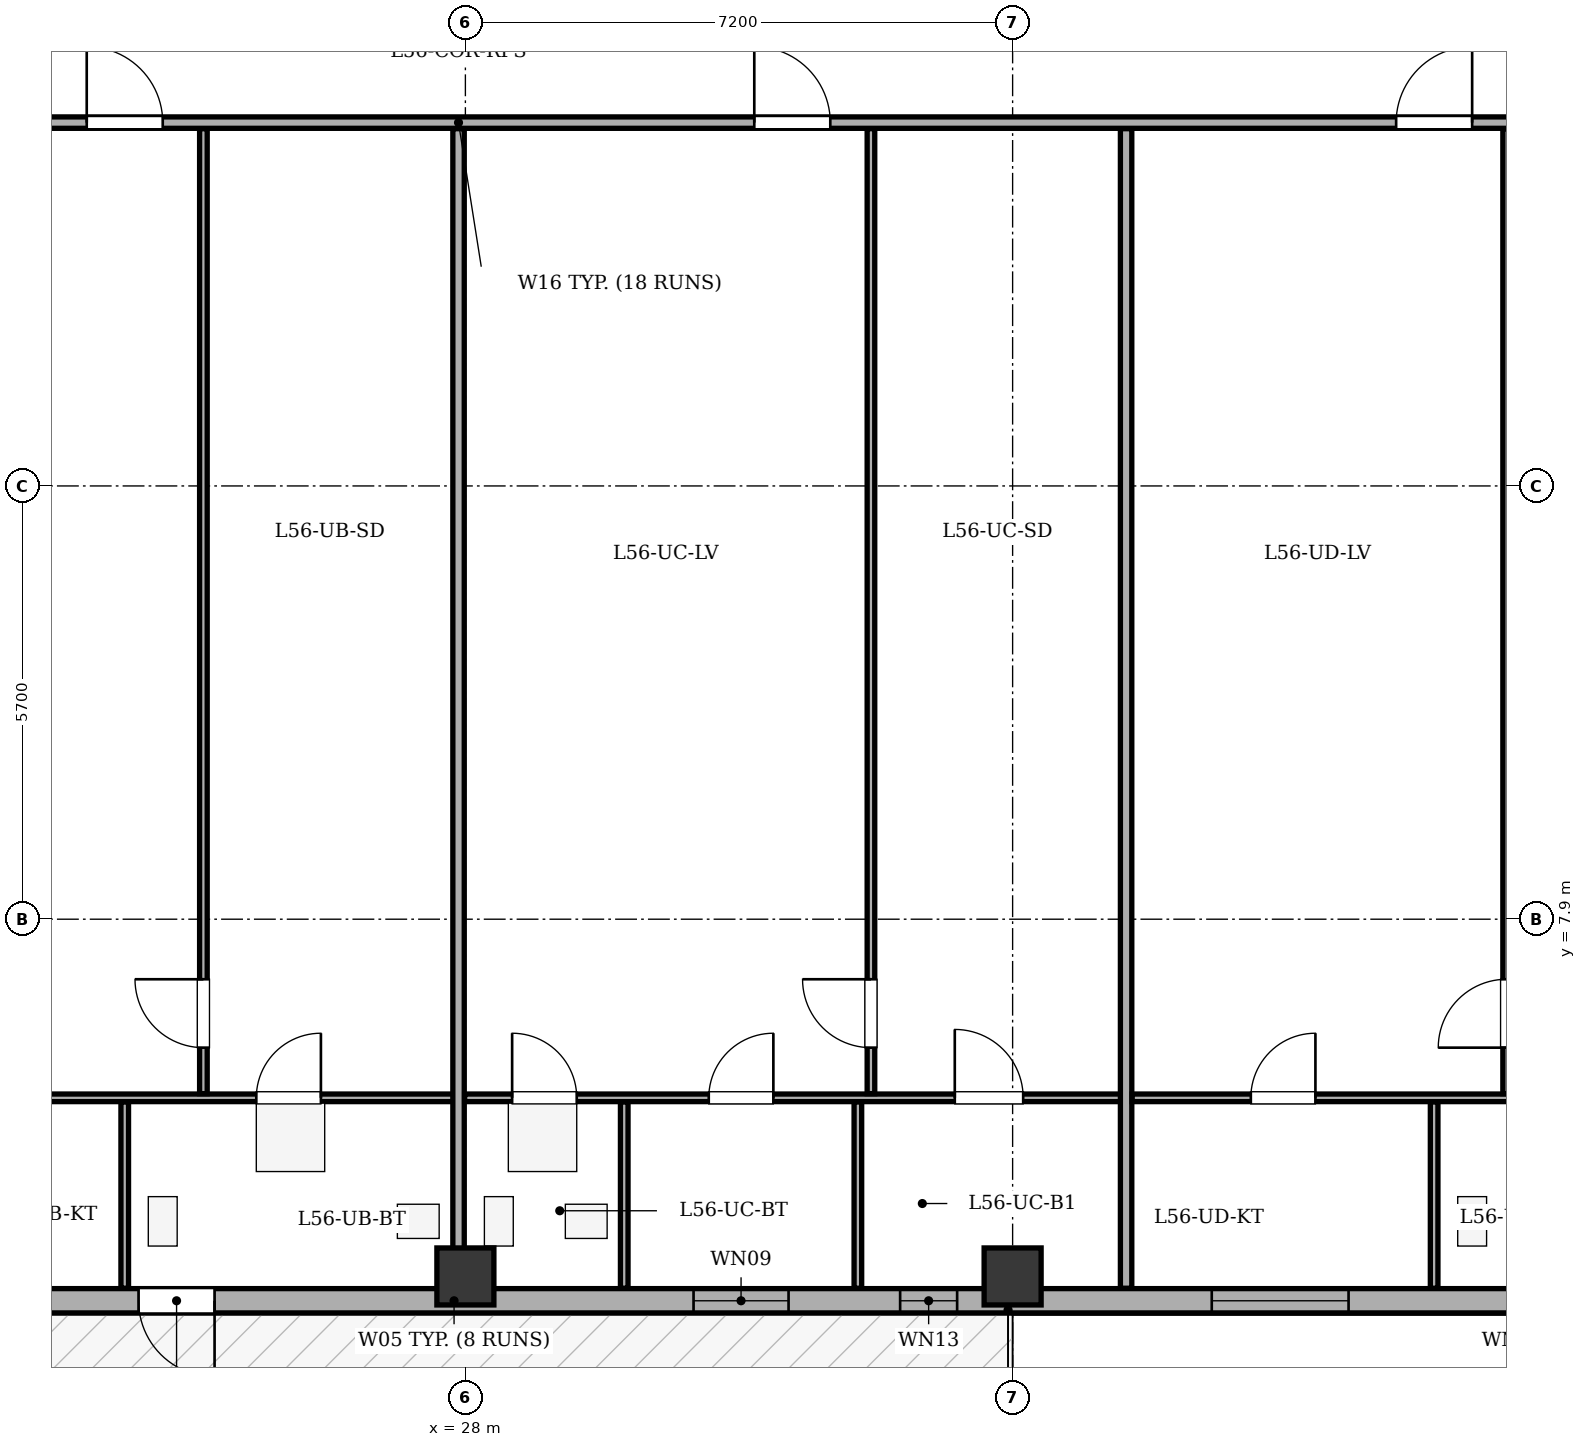
"""IFC4 building model, lengths in metres.
Left out: names, types, materials, properties, quantities, classifications, styles, units other than length and angle.
Written with IfcOpenShell. Run it as: python <this file> out.ifc"""

import sys

from ifc_helpers import new_model, si_unit, direction, frame, frame_2d, origin, origin_2d, place, context, subcontext, project, spatial, rectangle, extrude, element, fill, save


model = new_model("IFC4")
c1 = context("Model", 3, precision=1e-05, world=origin(), true_north=direction((0.0, 1.0)))
c2 = subcontext(c1, "Body", "Model", "MODEL_VIEW")
j1 = project(units=[si_unit("LENGTHUNIT", "METRE"), si_unit("PLANEANGLEUNIT", "RADIAN")], contexts=[c1])
p1 = place(None, origin())
s1 = spatial("IfcSite", under=j1, at=p1, CompositionType="ELEMENT")
p2 = place(p1, origin())
s2 = spatial("IfcBuilding", under=s1, at=p2, CompositionType="ELEMENT")
p3 = place(p2, frame((0.0, 0.0, 217.7)))
s3 = spatial("IfcBuildingStorey", under=s2, at=p3, CompositionType="ELEMENT", Elevation=217.7)
for number, where, z_axis, x_axis in (
    (1, (28.0, 3.2, 0.0), (0.0, 0.0, 1.0), (1.0, 0.0, 0.0)),
    (2, (35.2, 3.2, 0.0), (0.0, 0.0, 1.0), (1.0, 0.0, 0.0)),
):
    element("IfcColumn", number, at=place(p3, frame(where, z_axis=z_axis, x_axis=x_axis)), inside=s3, PredefinedType="COLUMN", context=c2, shape_type="SweptSolid", body=[
        extrude(rectangle(XDim=0.75, YDim=0.75, at=origin_2d()), origin(), (0.0, 0.0, 1.0), 3.4),
    ])
p4 = place(p3, frame((44.8, 2.88, 0.0), z_axis=(0.0, 0.0, 1.0), x_axis=(-1.0, 0.0, 0.0)))
e3 = element("IfcWall", 3, at=p4, inside=s3, PredefinedType="STANDARD", context=c2, shape_type="SweptSolid", body=[
    extrude(rectangle(XDim=36.0, YDim=0.32, at=frame_2d((18.0, 0.0))), origin(), (0.0, 0.0, 1.0), 2.725),
])
p5 = place(p4, frame((20.1, 0.0, 0.0)))
e4 = element("IfcOpeningElement", 4, at=p5, cuts=e3, PredefinedType="OPENING", context=c2, shape_type="SweptSolid", body=[
    extrude(rectangle(XDim=1.0, YDim=2.02, at=frame_2d((0.5, 1.01))), frame((0.0, 0.17, 0.0), z_axis=(0.0, -1.0, 0.0), x_axis=(1.0, 0.0, 0.0)), (0.0, 0.0, 1.0), 0.34),
])
p6 = place(p4, frame((1.227, 0.0, 0.75)))
e5 = element("IfcOpeningElement", 5, at=p6, cuts=e3, PredefinedType="OPENING", context=c2, shape_type="SweptSolid", body=[
    extrude(rectangle(XDim=1.8, YDim=1.7, at=frame_2d((0.9, 0.85))), frame((0.0, 0.17, 0.0), z_axis=(0.0, -1.0, 0.0), x_axis=(1.0, 0.0, 0.0)), (0.0, 0.0, 1.0), 0.34),
])
p7 = place(p4, frame((5.18, 0.0, 0.75)))
e6 = element("IfcOpeningElement", 6, at=p7, cuts=e3, PredefinedType="OPENING", context=c2, shape_type="SweptSolid", body=[
    extrude(rectangle(XDim=1.8, YDim=1.7, at=frame_2d((0.9, 0.85))), frame((0.0, 0.17, 0.0), z_axis=(0.0, -1.0, 0.0), x_axis=(1.0, 0.0, 0.0)), (0.0, 0.0, 1.0), 0.34),
])
p8 = place(p4, frame((12.548, 0.0, 0.75)))
e7 = element("IfcOpeningElement", 7, at=p8, cuts=e3, PredefinedType="OPENING", context=c2, shape_type="SweptSolid", body=[
    extrude(rectangle(XDim=1.25, YDim=1.7, at=frame_2d((0.625, 0.85))), frame((0.0, 0.17, 0.0), z_axis=(0.0, -1.0, 0.0), x_axis=(1.0, 0.0, 0.0)), (0.0, 0.0, 1.0), 0.34),
])
p9 = place(p4, frame((26.8, 0.0, 0.75)))
e8 = element("IfcOpeningElement", 8, at=p9, cuts=e3, PredefinedType="OPENING", context=c2, shape_type="SweptSolid", body=[
    extrude(rectangle(XDim=1.8, YDim=1.7, at=frame_2d((0.9, 0.85))), frame((0.0, 0.17, 0.0), z_axis=(0.0, -1.0, 0.0), x_axis=(1.0, 0.0, 0.0)), (0.0, 0.0, 1.0), 0.34),
])
p10 = place(p4, frame((30.854, 0.0, 0.75)))
e9 = element("IfcOpeningElement", 9, at=p10, cuts=e3, PredefinedType="OPENING", context=c2, shape_type="SweptSolid", body=[
    extrude(rectangle(XDim=1.8, YDim=1.7, at=frame_2d((0.9, 0.85))), frame((0.0, 0.17, 0.0), z_axis=(0.0, -1.0, 0.0), x_axis=(1.0, 0.0, 0.0)), (0.0, 0.0, 1.0), 0.34),
])
p11 = place(p4, frame((10.33, 0.0, 0.75)))
e10 = element("IfcOpeningElement", 10, at=p11, cuts=e3, PredefinedType="OPENING", context=c2, shape_type="SweptSolid", body=[
    extrude(rectangle(XDim=0.75, YDim=1.45, at=frame_2d((0.375, 0.725))), frame((0.0, 0.17, 0.0), z_axis=(0.0, -1.0, 0.0), x_axis=(1.0, 0.0, 0.0)), (0.0, 0.0, 1.0), 0.34),
])
p12 = place(p3, frame((10.9, 18.38, 0.0), z_axis=(0.0, 0.0, 1.0), x_axis=(1.0, 0.0, 0.0)))
e11 = element("IfcWall", 11, at=p12, inside=s3, PredefinedType="PARTITIONING", context=c2, shape_type="SweptSolid", body=[
    extrude(rectangle(XDim=34.02, YDim=0.15, at=frame_2d((17.01, 0.0))), origin(), (0.0, 0.0, 1.0), 3.1),
])
p13 = place(p12, frame((3.674, 0.0, 0.0)))
e12 = element("IfcOpeningElement", 12, at=p13, cuts=e11, PredefinedType="OPENING", context=c2, shape_type="SweptSolid", body=[
    extrude(rectangle(XDim=1.0, YDim=2.1, at=frame_2d((0.5, 1.05))), frame((0.0, 0.085, 0.0), z_axis=(0.0, -1.0, 0.0), x_axis=(1.0, 0.0, 0.0)), (0.0, 0.0, 1.0), 0.17),
])
p14 = place(p12, frame((12.118, 0.0, 0.0)))
e13 = element("IfcOpeningElement", 13, at=p14, cuts=e11, PredefinedType="OPENING", context=c2, shape_type="SweptSolid", body=[
    extrude(rectangle(XDim=1.0, YDim=2.1, at=frame_2d((0.5, 1.05))), frame((0.0, 0.085, 0.0), z_axis=(0.0, -1.0, 0.0), x_axis=(1.0, 0.0, 0.0)), (0.0, 0.0, 1.0), 0.17),
])
p15 = place(p12, frame((20.901, 0.0, 0.0)))
e14 = element("IfcOpeningElement", 14, at=p15, cuts=e11, PredefinedType="OPENING", context=c2, shape_type="SweptSolid", body=[
    extrude(rectangle(XDim=1.0, YDim=2.1, at=frame_2d((0.5, 1.05))), frame((0.0, 0.085, 0.0), z_axis=(0.0, -1.0, 0.0), x_axis=(1.0, 0.0, 0.0)), (0.0, 0.0, 1.0), 0.17),
])
p16 = place(p12, frame((29.346, 0.0, 0.0)))
e15 = element("IfcOpeningElement", 15, at=p16, cuts=e11, PredefinedType="OPENING", context=c2, shape_type="SweptSolid", body=[
    extrude(rectangle(XDim=1.0, YDim=2.1, at=frame_2d((0.5, 1.05))), frame((0.0, 0.085, 0.0), z_axis=(0.0, -1.0, 0.0), x_axis=(1.0, 0.0, 0.0)), (0.0, 0.0, 1.0), 0.17),
])
p17 = place(p3, frame((19.207, 5.55, 0.0), z_axis=(0.0, 0.0, 1.0), x_axis=(1.0, 0.0, 0.0)))
e16 = element("IfcWall", 16, at=p17, inside=s3, PredefinedType="PARTITIONING", context=c2, shape_type="SweptSolid", body=[
    extrude(rectangle(XDim=8.743, YDim=0.1, at=frame_2d((4.372, 0.0))), origin(), (0.0, 0.0, 1.0), 3.1),
])
p18 = place(p17, frame((1.73, 0.0, 0.0)))
e17 = element("IfcOpeningElement", 17, at=p18, cuts=e16, PredefinedType="OPENING", context=c2, shape_type="SweptSolid", body=[
    extrude(rectangle(XDim=0.85, YDim=2.05, at=frame_2d((0.425, 1.025))), frame((0.0, 0.06, 0.0), z_axis=(0.0, -1.0, 0.0), x_axis=(1.0, 0.0, 0.0)), (0.0, 0.0, 1.0), 0.12),
])
p19 = place(p17, frame((6.042, 0.0, 0.0)))
e18 = element("IfcOpeningElement", 18, at=p19, cuts=e16, PredefinedType="OPENING", context=c2, shape_type="SweptSolid", body=[
    extrude(rectangle(XDim=0.85, YDim=2.05, at=frame_2d((0.425, 1.025))), frame((0.0, 0.06, 0.0), z_axis=(0.0, -1.0, 0.0), x_axis=(1.0, 0.0, 0.0)), (0.0, 0.0, 1.0), 0.12),
])
p20 = place(p3, frame((24.553, 5.605, 0.0), z_axis=(0.0, 0.0, 1.0), x_axis=(0.0, 1.0, 0.0)))
e19 = element("IfcWall", 19, at=p20, inside=s3, PredefinedType="PARTITIONING", context=c2, shape_type="SweptSolid", body=[
    extrude(rectangle(XDim=12.695, YDim=0.1, at=frame_2d((6.348, 0.0))), origin(), (0.0, 0.0, 1.0), 3.1),
])
p21 = place(p20, frame((0.605, 0.0, 0.0)))
e20 = element("IfcOpeningElement", 20, at=p21, cuts=e19, PredefinedType="OPENING", context=c2, shape_type="SweptSolid", body=[
    extrude(rectangle(XDim=0.9, YDim=2.05, at=frame_2d((0.45, 1.025))), frame((0.0, 0.06, 0.0), z_axis=(0.0, -1.0, 0.0), x_axis=(1.0, 0.0, 0.0)), (0.0, 0.0, 1.0), 0.12),
])
p22 = place(p3, frame((23.518, 3.045, 0.0), z_axis=(0.0, 0.0, 1.0), x_axis=(0.0, 1.0, 0.0)))
e21 = element("IfcWall", 21, at=p22, inside=s3, PredefinedType="PARTITIONING", context=c2, shape_type="SweptSolid", body=[
    extrude(rectangle(XDim=2.45, YDim=0.1, at=frame_2d((1.225, 0.0))), origin(), (0.0, 0.0, 1.0), 3.1),
])
p23 = place(p3, frame((27.91, 3.045, 0.0), z_axis=(0.0, 0.0, 1.0), x_axis=(0.0, 1.0, 0.0)))
e22 = element("IfcWall", 22, at=p23, inside=s3, PredefinedType="PARTITIONING", context=c2, shape_type="SweptSolid", body=[
    extrude(rectangle(XDim=15.255, YDim=0.15, at=frame_2d((7.627, 0.0))), origin(), (0.0, 0.0, 1.0), 2.535),
])
p24 = place(p3, frame((27.99, 5.55, 0.0), z_axis=(0.0, 0.0, 1.0), x_axis=(1.0, 0.0, 0.0)))
e23 = element("IfcWall", 23, at=p24, inside=s3, PredefinedType="PARTITIONING", context=c2, shape_type="SweptSolid", body=[
    extrude(rectangle(XDim=8.743, YDim=0.1, at=frame_2d((4.372, 0.0))), origin(), (0.0, 0.0, 1.0), 3.1),
])
p25 = place(p24, frame((0.625, 0.0, 0.0)))
e24 = element("IfcOpeningElement", 24, at=p25, cuts=e23, PredefinedType="OPENING", context=c2, shape_type="SweptSolid", body=[
    extrude(rectangle(XDim=0.85, YDim=2.05, at=frame_2d((0.425, 1.025))), frame((0.0, 0.06, 0.0), z_axis=(0.0, -1.0, 0.0), x_axis=(1.0, 0.0, 0.0)), (0.0, 0.0, 1.0), 0.12),
])
p26 = place(p24, frame((3.212, 0.0, 0.0)))
e25 = element("IfcOpeningElement", 25, at=p26, cuts=e23, PredefinedType="OPENING", context=c2, shape_type="SweptSolid", body=[
    extrude(rectangle(XDim=0.85, YDim=2.05, at=frame_2d((0.425, 1.025))), frame((0.0, 0.06, 0.0), z_axis=(0.0, -1.0, 0.0), x_axis=(1.0, 0.0, 0.0)), (0.0, 0.0, 1.0), 0.12),
])
p27 = place(p24, frame((6.449, 0.0, 0.0)))
e26 = element("IfcOpeningElement", 26, at=p27, cuts=e23, PredefinedType="OPENING", context=c2, shape_type="SweptSolid", body=[
    extrude(rectangle(XDim=0.9, YDim=2.05, at=frame_2d((0.45, 1.025))), frame((0.0, 0.06, 0.0), z_axis=(0.0, -1.0, 0.0), x_axis=(1.0, 0.0, 0.0)), (0.0, 0.0, 1.0), 0.12),
])
p28 = place(p3, frame((33.336, 5.605, 0.0), z_axis=(0.0, 0.0, 1.0), x_axis=(0.0, 1.0, 0.0)))
e27 = element("IfcWall", 27, at=p28, inside=s3, PredefinedType="PARTITIONING", context=c2, shape_type="SweptSolid", body=[
    extrude(rectangle(XDim=12.695, YDim=0.1, at=frame_2d((6.348, 0.0))), origin(), (0.0, 0.0, 1.0), 3.1),
])
p29 = place(p28, frame((0.605, 0.0, 0.0)))
e28 = element("IfcOpeningElement", 28, at=p29, cuts=e27, PredefinedType="OPENING", context=c2, shape_type="SweptSolid", body=[
    extrude(rectangle(XDim=0.9, YDim=2.05, at=frame_2d((0.45, 1.025))), frame((0.0, 0.06, 0.0), z_axis=(0.0, -1.0, 0.0), x_axis=(1.0, 0.0, 0.0)), (0.0, 0.0, 1.0), 0.12),
])
for number, where, z_axis, x_axis in (
    (29, (30.09, 3.045, 0.0), (0.0, 0.0, 1.0), (0.0, 1.0, 0.0)),
    (30, (33.164, 3.045, 0.0), (0.0, 0.0, 1.0), (0.0, 1.0, 0.0)),
):
    element("IfcWall", number, at=place(p3, frame(where, z_axis=z_axis, x_axis=x_axis)), inside=s3, PredefinedType="PARTITIONING", context=c2, shape_type="SweptSolid", body=[
        extrude(rectangle(XDim=2.45, YDim=0.1, at=frame_2d((1.225, 0.0))), origin(), (0.0, 0.0, 1.0), 3.1),
    ])
p30 = place(p3, frame((36.693, 3.045, 0.0), z_axis=(0.0, 0.0, 1.0), x_axis=(0.0, 1.0, 0.0)))
e31 = element("IfcWall", 31, at=p30, inside=s3, PredefinedType="PARTITIONING", context=c2, shape_type="SweptSolid", body=[
    extrude(rectangle(XDim=15.255, YDim=0.15, at=frame_2d((7.627, 0.0))), origin(), (0.0, 0.0, 1.0), 2.725),
])
p31 = place(p3, frame((36.773, 5.55, 0.0), z_axis=(0.0, 0.0, 1.0), x_axis=(1.0, 0.0, 0.0)))
e32 = element("IfcWall", 32, at=p31, inside=s3, PredefinedType="PARTITIONING", context=c2, shape_type="SweptSolid", body=[
    extrude(rectangle(XDim=8.067, YDim=0.1, at=frame_2d((4.034, 0.0))), origin(), (0.0, 0.0, 1.0), 3.1),
])
p32 = place(p31, frame((1.561, 0.0, 0.0)))
e33 = element("IfcOpeningElement", 33, at=p32, cuts=e32, PredefinedType="OPENING", context=c2, shape_type="SweptSolid", body=[
    extrude(rectangle(XDim=0.85, YDim=2.05, at=frame_2d((0.425, 1.025))), frame((0.0, 0.06, 0.0), z_axis=(0.0, -1.0, 0.0), x_axis=(1.0, 0.0, 0.0)), (0.0, 0.0, 1.0), 0.12),
])
p33 = place(p31, frame((5.535, 0.0, 0.0)))
e34 = element("IfcOpeningElement", 34, at=p33, cuts=e32, PredefinedType="OPENING", context=c2, shape_type="SweptSolid", body=[
    extrude(rectangle(XDim=0.85, YDim=2.05, at=frame_2d((0.425, 1.025))), frame((0.0, 0.06, 0.0), z_axis=(0.0, -1.0, 0.0), x_axis=(1.0, 0.0, 0.0)), (0.0, 0.0, 1.0), 0.12),
])
p34 = place(p3, frame((41.7, 5.605, 0.0), z_axis=(0.0, 0.0, 1.0), x_axis=(0.0, 1.0, 0.0)))
e35 = element("IfcWall", 35, at=p34, inside=s3, PredefinedType="PARTITIONING", context=c2, shape_type="SweptSolid", body=[
    extrude(rectangle(XDim=12.695, YDim=0.1, at=frame_2d((6.348, 0.0))), origin(), (0.0, 0.0, 1.0), 3.1),
])
p35 = place(p34, frame((0.605, 0.0, 0.0)))
e36 = element("IfcOpeningElement", 36, at=p35, cuts=e35, PredefinedType="OPENING", context=c2, shape_type="SweptSolid", body=[
    extrude(rectangle(XDim=0.9, YDim=2.05, at=frame_2d((0.45, 1.025))), frame((0.0, 0.06, 0.0), z_axis=(0.0, -1.0, 0.0), x_axis=(1.0, 0.0, 0.0)), (0.0, 0.0, 1.0), 0.12),
])
p36 = place(p3, frame((40.746, 3.045, 0.0), z_axis=(0.0, 0.0, 1.0), x_axis=(0.0, 1.0, 0.0)))
e37 = element("IfcWall", 37, at=p36, inside=s3, PredefinedType="PARTITIONING", context=c2, shape_type="SweptSolid", body=[
    extrude(rectangle(XDim=2.45, YDim=0.1, at=frame_2d((1.225, 0.0))), origin(), (0.0, 0.0, 1.0), 3.1),
])
p37 = place(p5, origin())
e38 = element("IfcDoor", 38, at=p37, inside=s3, OperationType="SINGLE_SWING_LEFT", PredefinedType="DOOR", context=c2, shape_type="SweptSolid", body=[
    extrude(rectangle(XDim=1.0, YDim=2.02, at=frame_2d((0.5, 1.01))), frame((0.0, 0.025, 0.0), z_axis=(0.0, -1.0, 0.0), x_axis=(1.0, 0.0, 0.0)), (0.0, 0.0, 1.0), 0.05),
])
fill(e4, e38)
p38 = place(p7, origin())
e39 = element("IfcWindow", 39, at=p38, inside=s3, PartitioningType="SINGLE_PANEL", PredefinedType="WINDOW", context=c2, shape_type="SweptSolid", body=[
    extrude(rectangle(XDim=1.8, YDim=1.7, at=frame_2d((0.9, 0.85))), frame((0.0, -0.01, 0.0), z_axis=(0.0, -1.0, 0.0), x_axis=(1.0, 0.0, 0.0)), (0.0, 0.0, 1.0), 0.06),
])
fill(e6, e39)
p39 = place(p8, origin())
e40 = element("IfcWindow", 40, at=p39, inside=s3, PartitioningType="SINGLE_PANEL", PredefinedType="WINDOW", context=c2, shape_type="SweptSolid", body=[
    extrude(rectangle(XDim=1.25, YDim=1.7, at=frame_2d((0.625, 0.85))), frame((0.0, -0.01, 0.0), z_axis=(0.0, -1.0, 0.0), x_axis=(1.0, 0.0, 0.0)), (0.0, 0.0, 1.0), 0.06),
])
fill(e7, e40)
p40 = place(p11, origin())
e41 = element("IfcWindow", 41, at=p40, inside=s3, PartitioningType="SINGLE_PANEL", PredefinedType="WINDOW", context=c2, shape_type="SweptSolid", body=[
    extrude(rectangle(XDim=0.75, YDim=1.45, at=frame_2d((0.375, 0.725))), frame((0.0, -0.01, 0.0), z_axis=(0.0, -1.0, 0.0), x_axis=(1.0, 0.0, 0.0)), (0.0, 0.0, 1.0), 0.06),
])
fill(e10, e41)
p41 = place(p14, origin())
e42 = element("IfcDoor", 42, at=p41, inside=s3, OperationType="SINGLE_SWING_LEFT", PredefinedType="DOOR", context=c2, shape_type="SweptSolid", body=[
    extrude(rectangle(XDim=1.0, YDim=2.1, at=frame_2d((0.5, 1.05))), frame((0.0, 0.025, 0.0), z_axis=(0.0, -1.0, 0.0), x_axis=(1.0, 0.0, 0.0)), (0.0, 0.0, 1.0), 0.05),
])
fill(e13, e42)
p42 = place(p15, origin())
e43 = element("IfcDoor", 43, at=p42, inside=s3, OperationType="SINGLE_SWING_LEFT", PredefinedType="DOOR", context=c2, shape_type="SweptSolid", body=[
    extrude(rectangle(XDim=1.0, YDim=2.1, at=frame_2d((0.5, 1.05))), frame((0.0, 0.025, 0.0), z_axis=(0.0, -1.0, 0.0), x_axis=(1.0, 0.0, 0.0)), (0.0, 0.0, 1.0), 0.05),
])
fill(e14, e43)
p43 = place(p16, origin())
e44 = element("IfcDoor", 44, at=p43, inside=s3, OperationType="SINGLE_SWING_RIGHT", PredefinedType="DOOR", context=c2, shape_type="SweptSolid", body=[
    extrude(rectangle(XDim=1.0, YDim=2.1, at=frame_2d((0.5, 1.05))), frame((0.0, 0.025, 0.0), z_axis=(0.0, -1.0, 0.0), x_axis=(1.0, 0.0, 0.0)), (0.0, 0.0, 1.0), 0.05),
])
fill(e15, e44)
p44 = place(p21, origin())
e45 = element("IfcDoor", 45, at=p44, inside=s3, OperationType="SINGLE_SWING_RIGHT", PredefinedType="DOOR", context=c2, shape_type="SweptSolid", body=[
    extrude(rectangle(XDim=0.9, YDim=2.05, at=frame_2d((0.45, 1.025))), frame((0.0, 0.025, 0.0), z_axis=(0.0, -1.0, 0.0), x_axis=(1.0, 0.0, 0.0)), (0.0, 0.0, 1.0), 0.05),
])
fill(e20, e45)
p45 = place(p19, origin())
e46 = element("IfcDoor", 46, at=p45, inside=s3, OperationType="SINGLE_SWING_RIGHT", PredefinedType="DOOR", context=c2, shape_type="SweptSolid", body=[
    extrude(rectangle(XDim=0.85, YDim=2.05, at=frame_2d((0.425, 1.025))), frame((0.0, 0.025, 0.0), z_axis=(0.0, -1.0, 0.0), x_axis=(1.0, 0.0, 0.0)), (0.0, 0.0, 1.0), 0.05),
])
fill(e18, e46)
p46 = place(p29, origin())
e47 = element("IfcDoor", 47, at=p46, inside=s3, OperationType="SINGLE_SWING_RIGHT", PredefinedType="DOOR", context=c2, shape_type="SweptSolid", body=[
    extrude(rectangle(XDim=0.9, YDim=2.05, at=frame_2d((0.45, 1.025))), frame((0.0, 0.025, 0.0), z_axis=(0.0, -1.0, 0.0), x_axis=(1.0, 0.0, 0.0)), (0.0, 0.0, 1.0), 0.05),
])
fill(e28, e47)
p47 = place(p25, origin())
e48 = element("IfcDoor", 48, at=p47, inside=s3, OperationType="SINGLE_SWING_LEFT", PredefinedType="DOOR", context=c2, shape_type="SweptSolid", body=[
    extrude(rectangle(XDim=0.85, YDim=2.05, at=frame_2d((0.425, 1.025))), frame((0.0, 0.025, 0.0), z_axis=(0.0, -1.0, 0.0), x_axis=(1.0, 0.0, 0.0)), (0.0, 0.0, 1.0), 0.05),
])
fill(e24, e48)
p48 = place(p26, origin())
e49 = element("IfcDoor", 49, at=p48, inside=s3, OperationType="SINGLE_SWING_RIGHT", PredefinedType="DOOR", context=c2, shape_type="SweptSolid", body=[
    extrude(rectangle(XDim=0.85, YDim=2.05, at=frame_2d((0.425, 1.025))), frame((0.0, 0.025, 0.0), z_axis=(0.0, -1.0, 0.0), x_axis=(1.0, 0.0, 0.0)), (0.0, 0.0, 1.0), 0.05),
])
fill(e25, e49)
p49 = place(p27, origin())
e50 = element("IfcDoor", 50, at=p49, inside=s3, OperationType="SINGLE_SWING_LEFT", PredefinedType="DOOR", context=c2, shape_type="SweptSolid", body=[
    extrude(rectangle(XDim=0.9, YDim=2.05, at=frame_2d((0.45, 1.025))), frame((0.0, 0.025, 0.0), z_axis=(0.0, -1.0, 0.0), x_axis=(1.0, 0.0, 0.0)), (0.0, 0.0, 1.0), 0.05),
])
fill(e26, e50)
p50 = place(p35, origin())
e51 = element("IfcDoor", 51, at=p50, inside=s3, OperationType="SINGLE_SWING_LEFT", PredefinedType="DOOR", context=c2, shape_type="SweptSolid", body=[
    extrude(rectangle(XDim=0.9, YDim=2.05, at=frame_2d((0.45, 1.025))), frame((0.0, 0.025, 0.0), z_axis=(0.0, -1.0, 0.0), x_axis=(1.0, 0.0, 0.0)), (0.0, 0.0, 1.0), 0.05),
])
fill(e36, e51)
p51 = place(p32, origin())
e52 = element("IfcDoor", 52, at=p51, inside=s3, OperationType="SINGLE_SWING_RIGHT", PredefinedType="DOOR", context=c2, shape_type="SweptSolid", body=[
    extrude(rectangle(XDim=0.85, YDim=2.05, at=frame_2d((0.425, 1.025))), frame((0.0, 0.025, 0.0), z_axis=(0.0, -1.0, 0.0), x_axis=(1.0, 0.0, 0.0)), (0.0, 0.0, 1.0), 0.05),
])
fill(e33, e52)
save(model, sys.argv[1])
